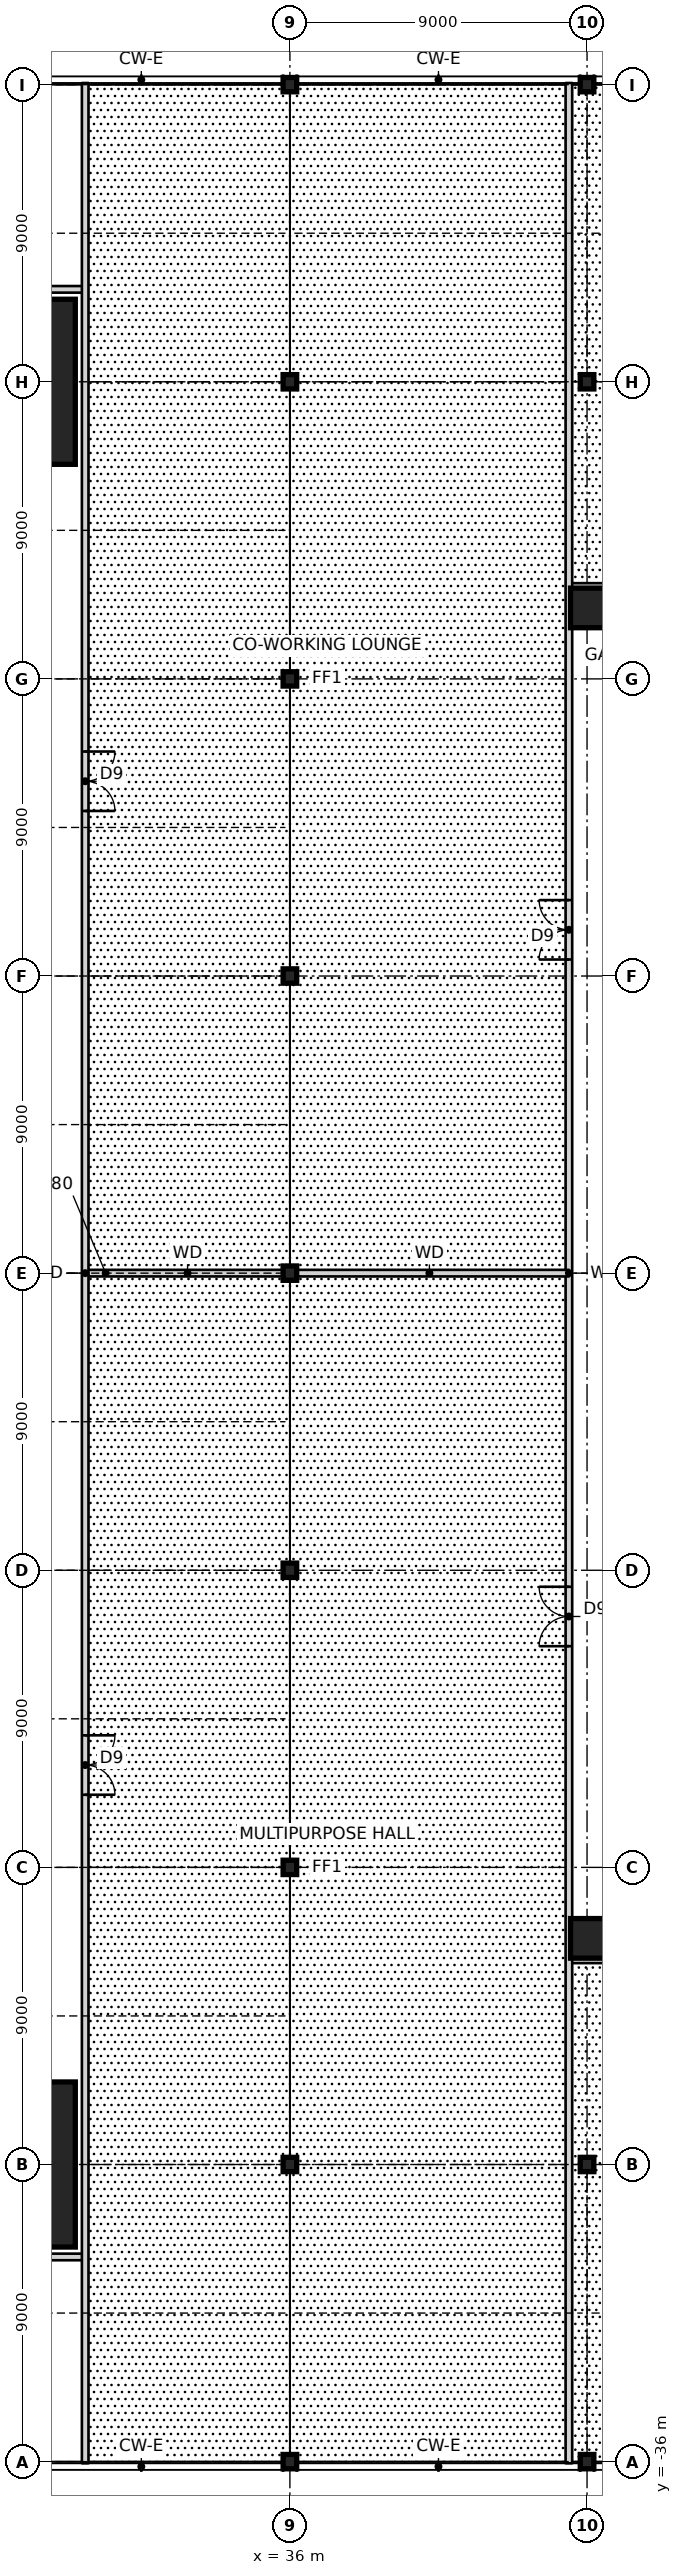
"""IFC4 building model, lengths in metres.
Left out: names, types, materials, properties, quantities, classifications, styles, units other than length and angle.
Written with IfcOpenShell. Run it as: python <this file> out.ifc"""

import sys

from ifc_helpers import new_model, si_unit, direction, frame, frame_2d, origin, origin_2d, place, context, subcontext, project, spatial, rectangle, hollow_rectangle, i_section, extrude, element, fill, save


model = new_model("IFC4")
c1 = context("Model", 3, precision=1e-05, world=origin(), true_north=direction((0.0, 1.0)))
c2 = subcontext(c1, "Body", "Model", "MODEL_VIEW")
j1 = project(units=[si_unit("LENGTHUNIT", "METRE"), si_unit("PLANEANGLEUNIT", "RADIAN")], contexts=[c1])
p1 = place(None, origin())
s1 = spatial("IfcSite", under=j1, at=p1, CompositionType="ELEMENT")
p2 = place(p1, origin())
s2 = spatial("IfcBuilding", under=s1, at=p2, CompositionType="ELEMENT")
p3 = place(p2, frame((0.0, 0.0, 10.5)))
s3 = spatial("IfcBuildingStorey", under=s2, at=p3, CompositionType="ELEMENT", Elevation=10.5)
for number, where, z_axis, x_axis in (
    (1, (27.0, -27.0, 0.0), (0.0, 0.0, 1.0), (1.0, 0.0, 0.0)),
    (2, (27.0, 27.0, 0.0), (0.0, 0.0, 1.0), (1.0, 0.0, 0.0)),
):
    element("IfcColumn", number, at=place(p3, frame(where, z_axis=z_axis, x_axis=x_axis)), inside=s3, PredefinedType="COLUMN", context=c2, shape_type="SweptSolid", body=[
        extrude(rectangle(XDim=5.0, YDim=5.0, at=origin_2d()), origin(), (0.0, 0.0, 1.0), 4.5),
        extrude(i_section(OverallWidth=0.478, OverallDepth=0.599, WebThickness=0.1, FlangeThickness=0.14, at=origin_2d()), origin(), (0.0, 0.0, 1.0), 4.5),
    ])
for number, where, z_axis, x_axis in (
    (3, (45.1, -20.15, 0.0), (0.0, 0.0, 1.0), (1.0, 0.0, 0.0)),
    (4, (45.1, 20.15, 0.0), (0.0, 0.0, 1.0), (1.0, 0.0, 0.0)),
):
    element("IfcColumn", number, at=place(p3, frame(where, z_axis=z_axis, x_axis=x_axis)), inside=s3, PredefinedType="COLUMN", context=c2, shape_type="SweptSolid", body=[
        extrude(hollow_rectangle(XDim=1.2, YDim=1.2, WallThickness=0.07, at=origin_2d()), origin(), (0.0, 0.0, 1.0), 4.5),
    ])
for number, where, z_axis, x_axis in (
    (5, (36.0, -36.0, 0.0), (0.0, 0.0, 1.0), (1.0, 0.0, 0.0)),
    (6, (36.0, -27.0, 0.0), (0.0, 0.0, 1.0), (1.0, 0.0, 0.0)),
    (7, (36.0, -18.0, 0.0), (0.0, 0.0, 1.0), (1.0, 0.0, 0.0)),
    (8, (36.0, -9.0, 0.0), (0.0, 0.0, 1.0), (1.0, 0.0, 0.0)),
    (9, (36.0, 0.0, 0.0), (0.0, 0.0, 1.0), (1.0, 0.0, 0.0)),
    (10, (36.0, 9.0, 0.0), (0.0, 0.0, 1.0), (1.0, 0.0, 0.0)),
    (11, (36.0, 18.0, 0.0), (0.0, 0.0, 1.0), (1.0, 0.0, 0.0)),
    (12, (36.0, 27.0, 0.0), (0.0, 0.0, 1.0), (1.0, 0.0, 0.0)),
    (13, (36.0, 36.0, 0.0), (0.0, 0.0, 1.0), (1.0, 0.0, 0.0)),
    (14, (45.0, -36.0, 0.0), (0.0, 0.0, 1.0), (1.0, 0.0, 0.0)),
    (15, (45.0, -27.0, 0.0), (0.0, 0.0, 1.0), (1.0, 0.0, 0.0)),
    (16, (45.0, 27.0, 0.0), (0.0, 0.0, 1.0), (1.0, 0.0, 0.0)),
    (17, (45.0, 36.0, 0.0), (0.0, 0.0, 1.0), (1.0, 0.0, 0.0)),
):
    element("IfcColumn", number, at=place(p3, frame(where, z_axis=z_axis, x_axis=x_axis)), inside=s3, PredefinedType="COLUMN", context=c2, shape_type="SweptSolid", body=[
        extrude(i_section(OverallWidth=0.411, OverallDepth=0.434, WebThickness=0.036, FlangeThickness=0.057, at=origin_2d()), origin(), (0.0, 0.0, 1.0), 4.5),
    ])
p4 = place(p3, frame((-29.8, -29.8, 0.0), z_axis=(0.0, 0.0, 1.0), x_axis=(1.0, 0.0, 0.0)))
e18 = element("IfcWall", 18, at=p4, inside=s3, PredefinedType="SOLIDWALL", context=c2, shape_type="SweptSolid", body=[
    extrude(rectangle(XDim=59.6, YDim=0.2, at=frame_2d((29.8, 0.0))), origin(), (0.0, 0.0, 1.0), 4.25),
])
p5 = place(p4, frame((9.5, 0.0, 0.0)))
e19 = element("IfcOpeningElement", 19, at=p5, cuts=e18, PredefinedType="OPENING", context=c2, shape_type="SweptSolid", body=[
    extrude(rectangle(XDim=1.8, YDim=2.1, at=frame_2d((0.9, 1.05))), frame((0.0, 0.11, 0.0), z_axis=(0.0, -1.0, 0.0), x_axis=(1.0, 0.0, 0.0)), (0.0, 0.0, 1.0), 0.22),
])
p6 = place(p4, frame((23.55, 0.0, 0.0)))
e20 = element("IfcOpeningElement", 20, at=p6, cuts=e18, PredefinedType="OPENING", context=c2, shape_type="SweptSolid", body=[
    extrude(rectangle(XDim=1.8, YDim=2.1, at=frame_2d((0.9, 1.05))), frame((0.0, 0.11, 0.0), z_axis=(0.0, -1.0, 0.0), x_axis=(1.0, 0.0, 0.0)), (0.0, 0.0, 1.0), 0.22),
])
p7 = place(p4, frame((28.9, 0.0, 0.0)))
e21 = element("IfcOpeningElement", 21, at=p7, cuts=e18, PredefinedType="OPENING", context=c2, shape_type="SweptSolid", body=[
    extrude(rectangle(XDim=1.8, YDim=2.1, at=frame_2d((0.9, 1.05))), frame((0.0, 0.11, 0.0), z_axis=(0.0, -1.0, 0.0), x_axis=(1.0, 0.0, 0.0)), (0.0, 0.0, 1.0), 0.22),
])
p8 = place(p4, frame((33.2, 0.0, 0.0)))
e22 = element("IfcOpeningElement", 22, at=p8, cuts=e18, PredefinedType="OPENING", context=c2, shape_type="SweptSolid", body=[
    extrude(rectangle(XDim=1.8, YDim=2.1, at=frame_2d((0.9, 1.05))), frame((0.0, 0.11, 0.0), z_axis=(0.0, -1.0, 0.0), x_axis=(1.0, 0.0, 0.0)), (0.0, 0.0, 1.0), 0.22),
])
p9 = place(p4, frame((42.95, 0.0, 0.0)))
e23 = element("IfcOpeningElement", 23, at=p9, cuts=e18, PredefinedType="OPENING", context=c2, shape_type="SweptSolid", body=[
    extrude(rectangle(XDim=1.8, YDim=2.1, at=frame_2d((0.9, 1.05))), frame((0.0, 0.11, 0.0), z_axis=(0.0, -1.0, 0.0), x_axis=(1.0, 0.0, 0.0)), (0.0, 0.0, 1.0), 0.22),
])
p10 = place(p4, frame((50.2, 0.0, 0.0)))
e24 = element("IfcOpeningElement", 24, at=p10, cuts=e18, PredefinedType="OPENING", context=c2, shape_type="SweptSolid", body=[
    extrude(rectangle(XDim=1.8, YDim=2.1, at=frame_2d((0.9, 1.05))), frame((0.0, 0.11, 0.0), z_axis=(0.0, -1.0, 0.0), x_axis=(1.0, 0.0, 0.0)), (0.0, 0.0, 1.0), 0.22),
])
p11 = place(p3, frame((44.45, -20.8, 0.0), z_axis=(0.0, 0.0, 1.0), x_axis=(1.0, 0.0, 0.0)))
e25 = element("IfcWall", 25, at=p11, inside=s3, PredefinedType="SOLIDWALL", context=c2, shape_type="SweptSolid", body=[
    extrude(rectangle(XDim=37.1, YDim=0.2, at=frame_2d((18.55, 0.0))), origin(), (0.0, 0.0, 1.0), 4.25),
])
p12 = place(p11, frame((3.325, 0.0, 0.0)))
e26 = element("IfcOpeningElement", 26, at=p12, cuts=e25, PredefinedType="OPENING", context=c2, shape_type="SweptSolid", body=[
    extrude(rectangle(XDim=1.8, YDim=2.1, at=frame_2d((0.9, 1.05))), frame((0.0, 0.11, 0.0), z_axis=(0.0, -1.0, 0.0), x_axis=(1.0, 0.0, 0.0)), (0.0, 0.0, 1.0), 0.22),
])
p13 = place(p11, frame((26.625, 0.0, 0.0)))
e27 = element("IfcOpeningElement", 27, at=p13, cuts=e25, PredefinedType="OPENING", context=c2, shape_type="SweptSolid", body=[
    extrude(rectangle(XDim=1.8, YDim=2.1, at=frame_2d((0.9, 1.05))), frame((0.0, 0.11, 0.0), z_axis=(0.0, -1.0, 0.0), x_axis=(1.0, 0.0, 0.0)), (0.0, 0.0, 1.0), 0.22),
])
p14 = place(p11, frame((8.65, 0.0, 0.0)))
e28 = element("IfcOpeningElement", 28, at=p14, cuts=e25, PredefinedType="OPENING", context=c2, shape_type="SweptSolid", body=[
    extrude(rectangle(XDim=1.8, YDim=2.1, at=frame_2d((0.9, 1.05))), frame((0.0, 0.11, 0.0), z_axis=(0.0, -1.0, 0.0), x_axis=(1.0, 0.0, 0.0)), (0.0, 0.0, 1.0), 0.22),
])
p15 = place(p3, frame((29.8, 0.0, 0.0), z_axis=(0.0, 0.0, 1.0), x_axis=(1.0, 0.0, 0.0)))
e29 = element("IfcWall", 29, at=p15, inside=s3, PredefinedType="SOLIDWALL", context=c2, shape_type="SweptSolid", body=[
    extrude(rectangle(XDim=6.2, YDim=0.2, at=frame_2d((3.1, 0.0))), origin(), (0.0, 0.0, 1.0), 3.48),
])
p16 = place(p3, frame((44.45, 20.8, 0.0), z_axis=(0.0, 0.0, 1.0), x_axis=(1.0, 0.0, 0.0)))
e30 = element("IfcWall", 30, at=p16, inside=s3, PredefinedType="SOLIDWALL", context=c2, shape_type="SweptSolid", body=[
    extrude(rectangle(XDim=37.1, YDim=0.2, at=frame_2d((18.55, 0.0))), origin(), (0.0, 0.0, 1.0), 4.25),
])
p17 = place(p16, frame((8.375, 0.0, 0.0)))
e31 = element("IfcOpeningElement", 31, at=p17, cuts=e30, PredefinedType="OPENING", context=c2, shape_type="SweptSolid", body=[
    extrude(rectangle(XDim=1.8, YDim=2.1, at=frame_2d((0.9, 1.05))), frame((0.0, 0.11, 0.0), z_axis=(0.0, -1.0, 0.0), x_axis=(1.0, 0.0, 0.0)), (0.0, 0.0, 1.0), 0.22),
])
p18 = place(p16, frame((28.625, 0.0, 0.0)))
e32 = element("IfcOpeningElement", 32, at=p18, cuts=e30, PredefinedType="OPENING", context=c2, shape_type="SweptSolid", body=[
    extrude(rectangle(XDim=1.8, YDim=2.1, at=frame_2d((0.9, 1.05))), frame((0.0, 0.11, 0.0), z_axis=(0.0, -1.0, 0.0), x_axis=(1.0, 0.0, 0.0)), (0.0, 0.0, 1.0), 0.22),
])
p19 = place(p16, frame((19.35, 0.0, 0.0)))
e33 = element("IfcOpeningElement", 33, at=p19, cuts=e30, PredefinedType="OPENING", context=c2, shape_type="SweptSolid", body=[
    extrude(rectangle(XDim=1.8, YDim=2.1, at=frame_2d((0.9, 1.05))), frame((0.0, 0.11, 0.0), z_axis=(0.0, -1.0, 0.0), x_axis=(1.0, 0.0, 0.0)), (0.0, 0.0, 1.0), 0.22),
])
p20 = place(p3, frame((-29.8, 29.8, 0.0), z_axis=(0.0, 0.0, 1.0), x_axis=(1.0, 0.0, 0.0)))
e34 = element("IfcWall", 34, at=p20, inside=s3, PredefinedType="SOLIDWALL", context=c2, shape_type="SweptSolid", body=[
    extrude(rectangle(XDim=59.6, YDim=0.2, at=frame_2d((29.8, 0.0))), origin(), (0.0, 0.0, 1.0), 4.25),
])
p21 = place(p20, frame((9.5, 0.0, 0.0)))
e35 = element("IfcOpeningElement", 35, at=p21, cuts=e34, PredefinedType="OPENING", context=c2, shape_type="SweptSolid", body=[
    extrude(rectangle(XDim=1.8, YDim=2.1, at=frame_2d((0.9, 1.05))), frame((0.0, 0.11, 0.0), z_axis=(0.0, -1.0, 0.0), x_axis=(1.0, 0.0, 0.0)), (0.0, 0.0, 1.0), 0.22),
])
p22 = place(p20, frame((23.55, 0.0, 0.0)))
e36 = element("IfcOpeningElement", 36, at=p22, cuts=e34, PredefinedType="OPENING", context=c2, shape_type="SweptSolid", body=[
    extrude(rectangle(XDim=1.8, YDim=2.1, at=frame_2d((0.9, 1.05))), frame((0.0, 0.11, 0.0), z_axis=(0.0, -1.0, 0.0), x_axis=(1.0, 0.0, 0.0)), (0.0, 0.0, 1.0), 0.22),
])
p23 = place(p20, frame((28.9, 0.0, 0.0)))
e37 = element("IfcOpeningElement", 37, at=p23, cuts=e34, PredefinedType="OPENING", context=c2, shape_type="SweptSolid", body=[
    extrude(rectangle(XDim=1.8, YDim=2.1, at=frame_2d((0.9, 1.05))), frame((0.0, 0.11, 0.0), z_axis=(0.0, -1.0, 0.0), x_axis=(1.0, 0.0, 0.0)), (0.0, 0.0, 1.0), 0.22),
])
p24 = place(p20, frame((33.2, 0.0, 0.0)))
e38 = element("IfcOpeningElement", 38, at=p24, cuts=e34, PredefinedType="OPENING", context=c2, shape_type="SweptSolid", body=[
    extrude(rectangle(XDim=1.8, YDim=2.1, at=frame_2d((0.9, 1.05))), frame((0.0, 0.11, 0.0), z_axis=(0.0, -1.0, 0.0), x_axis=(1.0, 0.0, 0.0)), (0.0, 0.0, 1.0), 0.22),
])
p25 = place(p20, frame((42.95, 0.0, 0.0)))
e39 = element("IfcOpeningElement", 39, at=p25, cuts=e34, PredefinedType="OPENING", context=c2, shape_type="SweptSolid", body=[
    extrude(rectangle(XDim=1.8, YDim=2.1, at=frame_2d((0.9, 1.05))), frame((0.0, 0.11, 0.0), z_axis=(0.0, -1.0, 0.0), x_axis=(1.0, 0.0, 0.0)), (0.0, 0.0, 1.0), 0.22),
])
p26 = place(p20, frame((50.2, 0.0, 0.0)))
e40 = element("IfcOpeningElement", 40, at=p26, cuts=e34, PredefinedType="OPENING", context=c2, shape_type="SweptSolid", body=[
    extrude(rectangle(XDim=1.8, YDim=2.1, at=frame_2d((0.9, 1.05))), frame((0.0, 0.11, 0.0), z_axis=(0.0, -1.0, 0.0), x_axis=(1.0, 0.0, 0.0)), (0.0, 0.0, 1.0), 0.22),
])
p27 = place(p3, frame((44.45, -36.05, 0.0), z_axis=(0.0, 0.0, 1.0), x_axis=(0.0, 1.0, 0.0)))
e41 = element("IfcWall", 41, at=p27, inside=s3, PredefinedType="SOLIDWALL", context=c2, shape_type="SweptSolid", body=[
    extrude(rectangle(XDim=72.1, YDim=0.2, at=frame_2d((36.05, 0.0))), origin(), (0.0, 0.0, 1.0), 4.25),
])
p28 = place(p27, frame((24.75, 0.0, 0.0)))
e42 = element("IfcOpeningElement", 42, at=p28, cuts=e41, PredefinedType="OPENING", context=c2, shape_type="SweptSolid", body=[
    extrude(rectangle(XDim=1.8, YDim=2.1, at=frame_2d((0.9, 1.05))), frame((0.0, 0.11, 0.0), z_axis=(0.0, -1.0, 0.0), x_axis=(1.0, 0.0, 0.0)), (0.0, 0.0, 1.0), 0.22),
])
p29 = place(p27, frame((45.55, 0.0, 0.0)))
e43 = element("IfcOpeningElement", 43, at=p29, cuts=e41, PredefinedType="OPENING", context=c2, shape_type="SweptSolid", body=[
    extrude(rectangle(XDim=1.8, YDim=2.1, at=frame_2d((0.9, 1.05))), frame((0.0, 0.11, 0.0), z_axis=(0.0, -1.0, 0.0), x_axis=(1.0, 0.0, 0.0)), (0.0, 0.0, 1.0), 0.22),
])
p30 = place(p3, frame((29.8, -36.05, 0.0), z_axis=(0.0, 0.0, 1.0), x_axis=(0.0, 1.0, 0.0)))
e44 = element("IfcWall", 44, at=p30, inside=s3, PredefinedType="SOLIDWALL", context=c2, shape_type="SweptSolid", body=[
    extrude(rectangle(XDim=72.1, YDim=0.2, at=frame_2d((36.05, 0.0))), origin(), (0.0, 0.0, 1.0), 4.25),
])
p31 = place(p30, frame((20.25, 0.0, 0.0)))
e45 = element("IfcOpeningElement", 45, at=p31, cuts=e44, PredefinedType="OPENING", context=c2, shape_type="SweptSolid", body=[
    extrude(rectangle(XDim=1.8, YDim=2.1, at=frame_2d((0.9, 1.05))), frame((0.0, 0.11, 0.0), z_axis=(0.0, -1.0, 0.0), x_axis=(1.0, 0.0, 0.0)), (0.0, 0.0, 1.0), 0.22),
])
p32 = place(p30, frame((50.05, 0.0, 0.0)))
e46 = element("IfcOpeningElement", 46, at=p32, cuts=e44, PredefinedType="OPENING", context=c2, shape_type="SweptSolid", body=[
    extrude(rectangle(XDim=1.8, YDim=2.1, at=frame_2d((0.9, 1.05))), frame((0.0, 0.11, 0.0), z_axis=(0.0, -1.0, 0.0), x_axis=(1.0, 0.0, 0.0)), (0.0, 0.0, 1.0), 0.22),
])
p33 = place(p3, frame((36.0, 0.0, 0.0), z_axis=(0.0, 0.0, 1.0), x_axis=(1.0, 0.0, 0.0)))
e47 = element("IfcWall", 47, at=p33, inside=s3, PredefinedType="SOLIDWALL", context=c2, shape_type="SweptSolid", body=[
    extrude(rectangle(XDim=8.45, YDim=0.2, at=frame_2d((4.225, 0.0))), origin(), (0.0, 0.0, 1.0), 4.25),
])
p34 = place(p31, frame((1.8, 0.0, 0.0), z_axis=(0.0, 0.0, 1.0), x_axis=(-1.0, 0.0, 0.0)))
e48 = element("IfcDoor", 48, at=p34, inside=s3, OperationType="DOUBLE_DOOR_SINGLE_SWING", PredefinedType="DOOR", context=c2, shape_type="SweptSolid", body=[
    extrude(rectangle(XDim=1.8, YDim=2.1, at=frame_2d((0.9, 1.05))), frame((0.0, 0.025, 0.0), z_axis=(0.0, -1.0, 0.0), x_axis=(1.0, 0.0, 0.0)), (0.0, 0.0, 1.0), 0.05),
])
fill(e45, e48)
p35 = place(p28, origin())
e49 = element("IfcDoor", 49, at=p35, inside=s3, OperationType="DOUBLE_DOOR_SINGLE_SWING", PredefinedType="DOOR", context=c2, shape_type="SweptSolid", body=[
    extrude(rectangle(XDim=1.8, YDim=2.1, at=frame_2d((0.9, 1.05))), frame((0.0, 0.025, 0.0), z_axis=(0.0, -1.0, 0.0), x_axis=(1.0, 0.0, 0.0)), (0.0, 0.0, 1.0), 0.05),
])
fill(e42, e49)
p36 = place(p32, frame((1.8, 0.0, 0.0), z_axis=(0.0, 0.0, 1.0), x_axis=(-1.0, 0.0, 0.0)))
e50 = element("IfcDoor", 50, at=p36, inside=s3, OperationType="DOUBLE_DOOR_SINGLE_SWING", PredefinedType="DOOR", context=c2, shape_type="SweptSolid", body=[
    extrude(rectangle(XDim=1.8, YDim=2.1, at=frame_2d((0.9, 1.05))), frame((0.0, 0.025, 0.0), z_axis=(0.0, -1.0, 0.0), x_axis=(1.0, 0.0, 0.0)), (0.0, 0.0, 1.0), 0.05),
])
fill(e46, e50)
p37 = place(p29, origin())
e51 = element("IfcDoor", 51, at=p37, inside=s3, OperationType="DOUBLE_DOOR_SINGLE_SWING", PredefinedType="DOOR", context=c2, shape_type="SweptSolid", body=[
    extrude(rectangle(XDim=1.8, YDim=2.1, at=frame_2d((0.9, 1.05))), frame((0.0, 0.025, 0.0), z_axis=(0.0, -1.0, 0.0), x_axis=(1.0, 0.0, 0.0)), (0.0, 0.0, 1.0), 0.05),
])
fill(e43, e51)
save(model, sys.argv[1])
